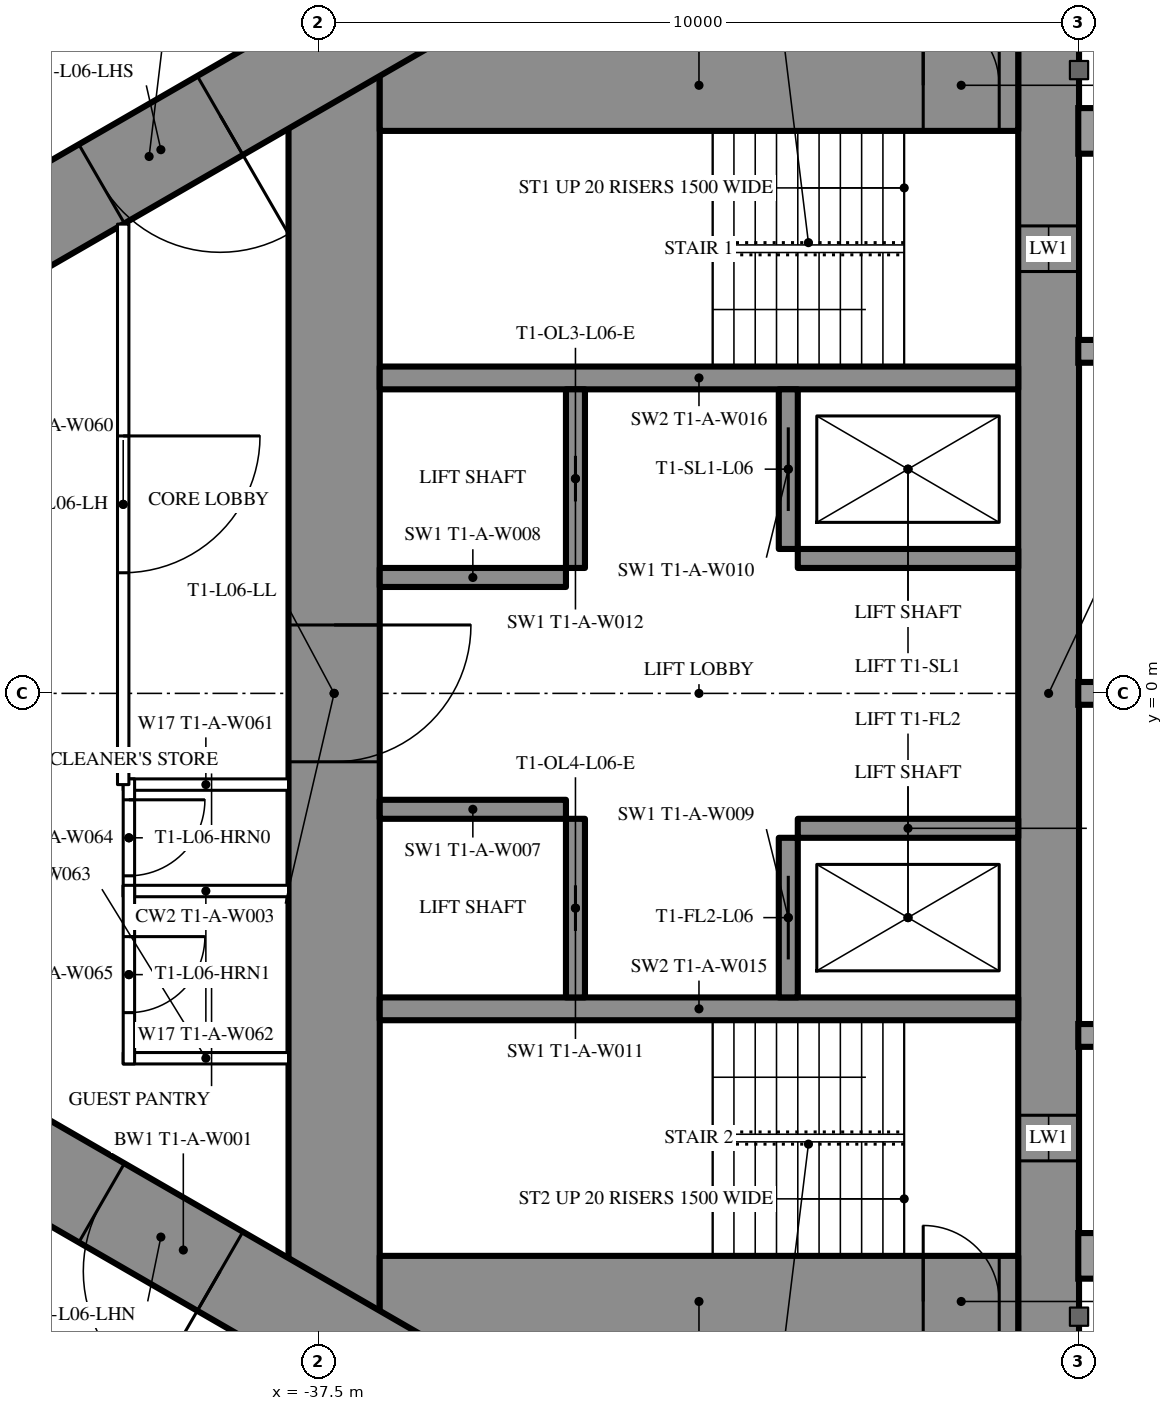
"""IFC4 building model, lengths in metres.
Left out: names, types, materials, properties, quantities, classifications, styles, units other than length and angle.
Written with IfcOpenShell. Run it as: python <this file> out.ifc"""

import sys

from ifc_helpers import new_model, si_unit, direction, frame, frame_2d, origin, place, context, subcontext, project, spatial, rectangle, extrude, element, fill, save


model = new_model("IFC4")
c1 = context("Model", 3, precision=1e-05, world=origin(), true_north=direction((0.0, 1.0)))
c2 = subcontext(c1, "Body", "Model", "MODEL_VIEW")
j1 = project(units=[si_unit("LENGTHUNIT", "METRE"), si_unit("PLANEANGLEUNIT", "RADIAN")], contexts=[c1])
p1 = place(None, origin())
s1 = spatial("IfcSite", under=j1, at=p1, CompositionType="ELEMENT")
p2 = place(p1, origin())
s2 = spatial("IfcBuilding", under=s1, at=p2, CompositionType="ELEMENT")
p3 = place(p2, frame((0.0, 0.0, 28.5)))
s3 = spatial("IfcBuildingStorey", under=s2, at=p3, CompositionType="ELEMENT", Elevation=28.5)
p4 = place(p3, frame((-27.9, 8.6, 0.0), z_axis=(0.0, 0.0, 1.0), x_axis=(0.0, -1.0, 0.0)))
e1 = element("IfcWall", 1, at=p4, inside=s3, PredefinedType="SHEAR", context=c2, shape_type="SweptSolid", body=[
    extrude(rectangle(XDim=17.2, YDim=0.8, at=frame_2d((8.6, 0.0))), origin(), (0.0, 0.0, 1.0), 3.5),
])
p5 = place(p4, frame((2.45, 0.0, 0.6)))
e2 = element("IfcOpeningElement", 2, at=p5, cuts=e1, PredefinedType="OPENING", context=c2, shape_type="SweptSolid", body=[
    extrude(rectangle(XDim=0.6, YDim=2.1, at=frame_2d((0.3, 1.05))), frame((0.0, 0.41, 0.0), z_axis=(0.0, -1.0, 0.0), x_axis=(1.0, 0.0, 0.0)), (0.0, 0.0, 1.0), 0.82),
])
p6 = place(p4, frame((14.15, 0.0, 0.6)))
e3 = element("IfcOpeningElement", 3, at=p6, cuts=e1, PredefinedType="OPENING", context=c2, shape_type="SweptSolid", body=[
    extrude(rectangle(XDim=0.6, YDim=2.1, at=frame_2d((0.3, 1.05))), frame((0.0, 0.41, 0.0), z_axis=(0.0, -1.0, 0.0), x_axis=(1.0, 0.0, 0.0)), (0.0, 0.0, 1.0), 0.82),
])
p7 = place(p3, frame((-37.3, 8.6, 0.0), z_axis=(0.0, 0.0, 1.0), x_axis=(0.0, -1.0, 0.0)))
e4 = element("IfcWall", 4, at=p7, inside=s3, PredefinedType="SHEAR", context=c2, shape_type="SweptSolid", body=[
    extrude(rectangle(XDim=17.2, YDim=1.2, at=frame_2d((8.6, 0.0))), origin(), (0.0, 0.0, 1.0), 3.5),
])
p8 = place(p7, frame((7.7, 0.0, 0.0)))
e5 = element("IfcOpeningElement", 5, at=p8, cuts=e4, PredefinedType="OPENING", context=c2, shape_type="SweptSolid", body=[
    extrude(rectangle(XDim=1.8, YDim=2.2, at=frame_2d((0.9, 1.1))), frame((0.0, 0.61, 0.0), z_axis=(0.0, -1.0, 0.0), x_axis=(1.0, 0.0, 0.0)), (0.0, 0.0, 1.0), 1.22),
])
p9 = place(p3, frame((-28.3, 8.0, 0.0), z_axis=(0.0, 0.0, 1.0), x_axis=(-1.0, 0.0, 0.0)))
e6 = element("IfcWall", 6, at=p9, inside=s3, PredefinedType="SHEAR", context=c2, shape_type="SweptSolid", body=[
    extrude(rectangle(XDim=8.4, YDim=1.2, at=frame_2d((4.2, 0.0))), origin(), (0.0, 0.0, 1.0), 3.5),
])
p10 = place(p9, frame((0.25, 0.0, 0.0)))
e7 = element("IfcOpeningElement", 7, at=p10, cuts=e6, PredefinedType="OPENING", context=c2, shape_type="SweptSolid", body=[
    extrude(rectangle(XDim=1.0, YDim=2.2, at=frame_2d((0.5, 1.1))), frame((0.0, 0.61, 0.0), z_axis=(0.0, -1.0, 0.0), x_axis=(1.0, 0.0, 0.0)), (0.0, 0.0, 1.0), 1.22),
])
p11 = place(p3, frame((-28.3, -8.0, 0.0), z_axis=(0.0, 0.0, 1.0), x_axis=(-1.0, 0.0, 0.0)))
e8 = element("IfcWall", 8, at=p11, inside=s3, PredefinedType="SHEAR", context=c2, shape_type="SweptSolid", body=[
    extrude(rectangle(XDim=8.4, YDim=1.2, at=frame_2d((4.2, 0.0))), origin(), (0.0, 0.0, 1.0), 3.5),
])
p12 = place(p11, frame((0.25, 0.0, 0.0)))
e9 = element("IfcOpeningElement", 9, at=p12, cuts=e8, PredefinedType="OPENING", context=c2, shape_type="SweptSolid", body=[
    extrude(rectangle(XDim=1.0, YDim=2.2, at=frame_2d((0.5, 1.1))), frame((0.0, 0.61, 0.0), z_axis=(0.0, -1.0, 0.0), x_axis=(1.0, 0.0, 0.0)), (0.0, 0.0, 1.0), 1.22),
])
for number, where, z_axis, x_axis in (
    (10, (-28.3, 4.15, 0.0), (0.0, 0.0, 1.0), (-1.0, 0.0, 0.0)),
    (11, (-28.3, -4.15, 0.0), (0.0, 0.0, 1.0), (-1.0, 0.0, 0.0)),
):
    element("IfcWall", number, at=place(p3, frame(where, z_axis=z_axis, x_axis=x_axis)), inside=s3, PredefinedType="SHEAR", context=c2, shape_type="SweptSolid", body=[
        extrude(rectangle(XDim=8.4, YDim=0.3, at=frame_2d((4.2, 0.0))), origin(), (0.0, 0.0, 1.0), 3.5),
    ])
p13 = place(p3, frame((-31.325, 4.0, 0.0), z_axis=(0.0, 0.0, 1.0), x_axis=(0.0, -1.0, 0.0)))
e12 = element("IfcWall", 12, at=p13, inside=s3, PredefinedType="SHEAR", context=c2, shape_type="SweptSolid", body=[
    extrude(rectangle(XDim=2.1, YDim=0.25, at=frame_2d((1.05, 0.0))), origin(), (0.0, 0.0, 1.0), 3.5),
])
p14 = place(p13, frame((0.5, 0.0, 0.0)))
e13 = element("IfcOpeningElement", 13, at=p14, cuts=e12, PredefinedType="OPENING", context=c2, shape_type="SweptSolid", body=[
    extrude(rectangle(XDim=1.1, YDim=2.2, at=frame_2d((0.55, 1.1))), frame((0.0, 0.135, 0.0), z_axis=(0.0, -1.0, 0.0), x_axis=(1.0, 0.0, 0.0)), (0.0, 0.0, 1.0), 0.27),
])
p15 = place(p3, frame((-34.125, 4.0, 0.0), z_axis=(0.0, 0.0, 1.0), x_axis=(0.0, -1.0, 0.0)))
e14 = element("IfcWall", 14, at=p15, inside=s3, PredefinedType="SHEAR", context=c2, shape_type="SweptSolid", body=[
    extrude(rectangle(XDim=2.35, YDim=0.25, at=frame_2d((1.175, 0.0))), origin(), (0.0, 0.0, 1.0), 3.5),
])
p16 = place(p15, frame((0.875, 0.0, 0.0)))
e15 = element("IfcOpeningElement", 15, at=p16, cuts=e14, PredefinedType="OPENING", context=c2, shape_type="SweptSolid", body=[
    extrude(rectangle(XDim=0.6, YDim=2.0, at=frame_2d((0.3, 1.0))), frame((0.0, 0.135, 0.0), z_axis=(0.0, -1.0, 0.0), x_axis=(1.0, 0.0, 0.0)), (0.0, 0.0, 1.0), 0.27),
])
p17 = place(p3, frame((-28.3, 1.775, 0.0), z_axis=(0.0, 0.0, 1.0), x_axis=(-1.0, 0.0, 0.0)))
e16 = element("IfcWall", 16, at=p17, inside=s3, PredefinedType="SHEAR", context=c2, shape_type="SweptSolid", body=[
    extrude(rectangle(XDim=2.9, YDim=0.25, at=frame_2d((1.45, 0.0))), origin(), (0.0, 0.0, 1.0), 3.5),
])
p18 = place(p3, frame((-34.25, 1.525, 0.0), z_axis=(0.0, 0.0, 1.0), x_axis=(-1.0, 0.0, 0.0)))
e17 = element("IfcWall", 17, at=p18, inside=s3, PredefinedType="SHEAR", context=c2, shape_type="SweptSolid", body=[
    extrude(rectangle(XDim=2.45, YDim=0.25, at=frame_2d((1.225, 0.0))), origin(), (0.0, 0.0, 1.0), 3.5),
])
p19 = place(p3, frame((-31.325, -1.9, 0.0), z_axis=(0.0, 0.0, 1.0), x_axis=(0.0, -1.0, 0.0)))
e18 = element("IfcWall", 18, at=p19, inside=s3, PredefinedType="SHEAR", context=c2, shape_type="SweptSolid", body=[
    extrude(rectangle(XDim=2.1, YDim=0.25, at=frame_2d((1.05, 0.0))), origin(), (0.0, 0.0, 1.0), 3.5),
])
p20 = place(p19, frame((0.5, 0.0, 0.0)))
e19 = element("IfcOpeningElement", 19, at=p20, cuts=e18, PredefinedType="OPENING", context=c2, shape_type="SweptSolid", body=[
    extrude(rectangle(XDim=1.1, YDim=2.2, at=frame_2d((0.55, 1.1))), frame((0.0, 0.135, 0.0), z_axis=(0.0, -1.0, 0.0), x_axis=(1.0, 0.0, 0.0)), (0.0, 0.0, 1.0), 0.27),
])
p21 = place(p3, frame((-34.125, -1.65, 0.0), z_axis=(0.0, 0.0, 1.0), x_axis=(0.0, -1.0, 0.0)))
e20 = element("IfcWall", 20, at=p21, inside=s3, PredefinedType="SHEAR", context=c2, shape_type="SweptSolid", body=[
    extrude(rectangle(XDim=2.35, YDim=0.25, at=frame_2d((1.175, 0.0))), origin(), (0.0, 0.0, 1.0), 3.5),
])
p22 = place(p21, frame((0.875, 0.0, 0.0)))
e21 = element("IfcOpeningElement", 21, at=p22, cuts=e20, PredefinedType="OPENING", context=c2, shape_type="SweptSolid", body=[
    extrude(rectangle(XDim=0.6, YDim=2.0, at=frame_2d((0.3, 1.0))), frame((0.0, 0.135, 0.0), z_axis=(0.0, -1.0, 0.0), x_axis=(1.0, 0.0, 0.0)), (0.0, 0.0, 1.0), 0.27),
])
p23 = place(p3, frame((-28.3, -1.775, 0.0), z_axis=(0.0, 0.0, 1.0), x_axis=(-1.0, 0.0, 0.0)))
e22 = element("IfcWall", 22, at=p23, inside=s3, PredefinedType="SHEAR", context=c2, shape_type="SweptSolid", body=[
    extrude(rectangle(XDim=2.9, YDim=0.25, at=frame_2d((1.45, 0.0))), origin(), (0.0, 0.0, 1.0), 3.5),
])
p24 = place(p3, frame((-34.25, -1.525, 0.0), z_axis=(0.0, 0.0, 1.0), x_axis=(-1.0, 0.0, 0.0)))
e23 = element("IfcWall", 23, at=p24, inside=s3, PredefinedType="SHEAR", context=c2, shape_type="SweptSolid", body=[
    extrude(rectangle(XDim=2.45, YDim=0.25, at=frame_2d((1.225, 0.0))), origin(), (0.0, 0.0, 1.0), 3.5),
])
p25 = place(p3, frame((-27.2, 14.3, 0.0), z_axis=(0.0, 0.0, 1.0), x_axis=(-0.866026593062, -0.499997940104, 0.0)))
e24 = element("IfcWall", 24, at=p25, inside=s3, PredefinedType="SHEAR", context=c2, shape_type="SweptSolid", body=[
    extrude(rectangle(XDim=28.946, YDim=1.2, at=frame_2d((14.473, 0.0))), origin(), (0.0, 0.0, 1.0), 3.5),
])
p26 = place(p25, frame((4.6, 0.0, 0.0)))
e25 = element("IfcOpeningElement", 25, at=p26, cuts=e24, PredefinedType="OPENING", context=c2, shape_type="SweptSolid", body=[
    extrude(rectangle(XDim=1.0, YDim=2.2, at=frame_2d((0.5, 1.1))), frame((0.0, 0.61, 0.0), z_axis=(0.0, -1.0, 0.0), x_axis=(1.0, 0.0, 0.0)), (0.0, 0.0, 1.0), 1.22),
])
p27 = place(p25, frame((13.395, 0.0, 0.0)))
e26 = element("IfcOpeningElement", 26, at=p27, cuts=e24, PredefinedType="OPENING", context=c2, shape_type="SweptSolid", body=[
    extrude(rectangle(XDim=1.8, YDim=2.2, at=frame_2d((0.9, 1.1))), frame((0.0, 0.61, 0.0), z_axis=(0.0, -1.0, 0.0), x_axis=(1.0, 0.0, 0.0)), (0.0, 0.0, 1.0), 1.22),
])
p28 = place(p3, frame((-27.2, -14.3, 0.0), z_axis=(0.0, 0.0, 1.0), x_axis=(-0.866024021859, 0.500002393557, 0.0)))
e27 = element("IfcWall", 27, at=p28, inside=s3, PredefinedType="SHEAR", context=c2, shape_type="SweptSolid", body=[
    extrude(rectangle(XDim=27.907, YDim=1.2, at=frame_2d((13.954, 0.0))), origin(), (0.0, 0.0, 1.0), 3.5),
])
p29 = place(p28, frame((4.6, 0.0, 0.0)))
e28 = element("IfcOpeningElement", 28, at=p29, cuts=e27, PredefinedType="OPENING", context=c2, shape_type="SweptSolid", body=[
    extrude(rectangle(XDim=1.0, YDim=2.2, at=frame_2d((0.5, 1.1))), frame((0.0, 0.61, 0.0), z_axis=(0.0, -1.0, 0.0), x_axis=(1.0, 0.0, 0.0)), (0.0, 0.0, 1.0), 1.22),
])
p30 = place(p28, frame((13.395, 0.0, 0.0)))
e29 = element("IfcOpeningElement", 29, at=p30, cuts=e27, PredefinedType="OPENING", context=c2, shape_type="SweptSolid", body=[
    extrude(rectangle(XDim=1.8, YDim=2.2, at=frame_2d((0.9, 1.1))), frame((0.0, 0.61, 0.0), z_axis=(0.0, -1.0, 0.0), x_axis=(1.0, 0.0, 0.0)), (0.0, 0.0, 1.0), 1.22),
])
p31 = place(p3, frame((-37.7, 10.894, 0.0), z_axis=(0.0, 0.0, 1.0), x_axis=(-0.866027905338, -0.499995667157, 0.0)))
e30 = element("IfcWall", 30, at=p31, inside=s3, PredefinedType="PARTITIONING", context=c2, shape_type="SweptSolid", body=[
    extrude(rectangle(XDim=21.787, YDim=0.2, at=frame_2d((10.894, 0.0))), origin(), (0.0, 0.0, 1.0), 3.25),
])
p32 = place(p31, frame((16.008, 0.0, 0.0)))
e31 = element("IfcOpeningElement", 31, at=p32, cuts=e30, PredefinedType="OPENING", context=c2, shape_type="SweptSolid", body=[
    extrude(rectangle(XDim=0.95, YDim=2.2, at=frame_2d((0.475, 1.1))), frame((0.0, 0.11, 0.0), z_axis=(0.0, -1.0, 0.0), x_axis=(1.0, 0.0, 0.0)), (0.0, 0.0, 1.0), 0.22),
])
p33 = place(p31, frame((20.058, 0.0, 0.0)))
e32 = element("IfcOpeningElement", 32, at=p33, cuts=e30, PredefinedType="OPENING", context=c2, shape_type="SweptSolid", body=[
    extrude(rectangle(XDim=0.95, YDim=2.2, at=frame_2d((0.475, 1.1))), frame((0.0, 0.11, 0.0), z_axis=(0.0, -1.0, 0.0), x_axis=(1.0, 0.0, 0.0)), (0.0, 0.0, 1.0), 0.22),
])
p34 = place(p31, frame((2.95, 0.0, 0.0)))
e33 = element("IfcOpeningElement", 33, at=p34, cuts=e30, PredefinedType="OPENING", context=c2, shape_type="SweptSolid", body=[
    extrude(rectangle(XDim=0.95, YDim=2.2, at=frame_2d((0.475, 1.1))), frame((0.0, 0.11, 0.0), z_axis=(0.0, -1.0, 0.0), x_axis=(1.0, 0.0, 0.0)), (0.0, 0.0, 1.0), 0.22),
])
p35 = place(p3, frame((-36.92, -11.344, 0.0), z_axis=(0.0, 0.0, 1.0), x_axis=(-0.866028313256, 0.499994960614, 0.0)))
e34 = element("IfcWall", 34, at=p35, inside=s3, PredefinedType="PARTITIONING", context=c2, shape_type="SweptSolid", body=[
    extrude(rectangle(XDim=22.568, YDim=0.2, at=frame_2d((11.284, 0.0))), origin(), (0.0, 0.0, 1.0), 3.25),
])
p36 = place(p35, frame((12.68, 0.0, 0.0)))
e35 = element("IfcOpeningElement", 35, at=p36, cuts=e34, PredefinedType="OPENING", context=c2, shape_type="SweptSolid", body=[
    extrude(rectangle(XDim=0.95, YDim=2.2, at=frame_2d((0.475, 1.1))), frame((0.0, 0.11, 0.0), z_axis=(0.0, -1.0, 0.0), x_axis=(1.0, 0.0, 0.0)), (0.0, 0.0, 1.0), 0.22),
])
p37 = place(p35, frame((3.35, 0.0, 0.0)))
e36 = element("IfcOpeningElement", 36, at=p37, cuts=e34, PredefinedType="OPENING", context=c2, shape_type="SweptSolid", body=[
    extrude(rectangle(XDim=1.0, YDim=2.2, at=frame_2d((0.5, 1.1))), frame((0.0, 0.11, 0.0), z_axis=(0.0, -1.0, 0.0), x_axis=(1.0, 0.0, 0.0)), (0.0, 0.0, 1.0), 0.22),
])
for number, where, z_axis, x_axis in (
    (37, (-37.9, -1.2, 0.0), (0.0, 0.0, 1.0), (-1.0, 0.0, 0.0)),
    (38, (-37.9, -2.6, 0.0), (0.0, 0.0, 1.0), (-1.0, 0.0, 0.0)),
    (39, (-37.9, -4.8, 0.0), (0.0, 0.0, 1.0), (-1.0, 0.0, 0.0)),
):
    element("IfcWall", number, at=place(p3, frame(where, z_axis=z_axis, x_axis=x_axis)), inside=s3, PredefinedType="PARTITIONING", context=c2, shape_type="SweptSolid", body=[
        extrude(rectangle(XDim=2.175, YDim=0.15, at=frame_2d((1.087, 0.0))), origin(), (0.0, 0.0, 1.0), 3.25),
    ])
p38 = place(p3, frame((-40.0, -1.125, 0.0), z_axis=(0.0, 0.0, 1.0), x_axis=(0.0, -1.0, 0.0)))
e40 = element("IfcWall", 40, at=p38, inside=s3, PredefinedType="PARTITIONING", context=c2, shape_type="SweptSolid", body=[
    extrude(rectangle(XDim=1.55, YDim=0.15, at=frame_2d((0.775, 0.0))), origin(), (0.0, 0.0, 1.0), 3.25),
])
p39 = place(p38, frame((0.275, 0.0, 0.0)))
e41 = element("IfcOpeningElement", 41, at=p39, cuts=e40, PredefinedType="OPENING", context=c2, shape_type="SweptSolid", body=[
    extrude(rectangle(XDim=1.0, YDim=2.2, at=frame_2d((0.5, 1.1))), frame((0.0, 0.085, 0.0), z_axis=(0.0, -1.0, 0.0), x_axis=(1.0, 0.0, 0.0)), (0.0, 0.0, 1.0), 0.17),
])
p40 = place(p3, frame((-40.0, -2.525, 0.0), z_axis=(0.0, 0.0, 1.0), x_axis=(0.0, -1.0, 0.0)))
e42 = element("IfcWall", 42, at=p40, inside=s3, PredefinedType="PARTITIONING", context=c2, shape_type="SweptSolid", body=[
    extrude(rectangle(XDim=2.35, YDim=0.15, at=frame_2d((1.175, 0.0))), origin(), (0.0, 0.0, 1.0), 3.25),
])
p41 = place(p40, frame((0.675, 0.0, 0.0)))
e43 = element("IfcOpeningElement", 43, at=p41, cuts=e42, PredefinedType="OPENING", context=c2, shape_type="SweptSolid", body=[
    extrude(rectangle(XDim=1.0, YDim=2.2, at=frame_2d((0.5, 1.1))), frame((0.0, 0.085, 0.0), z_axis=(0.0, -1.0, 0.0), x_axis=(1.0, 0.0, 0.0)), (0.0, 0.0, 1.0), 0.17),
])
p42 = place(p3, frame((-40.075, 6.174, 0.0), z_axis=(0.0, 0.0, 1.0), x_axis=(0.0, -1.0, 0.0)))
e44 = element("IfcWall", 44, at=p42, inside=s3, PredefinedType="PARTITIONING", context=c2, shape_type="SweptSolid", body=[
    extrude(rectangle(XDim=7.374, YDim=0.15, at=frame_2d((3.687, 0.0))), origin(), (0.0, 0.0, 1.0), 3.25),
])
p43 = place(p42, frame((2.787, 0.0, 0.0)))
e45 = element("IfcOpeningElement", 45, at=p43, cuts=e44, PredefinedType="OPENING", context=c2, shape_type="SweptSolid", body=[
    extrude(rectangle(XDim=1.8, YDim=2.2, at=frame_2d((0.9, 1.1))), frame((0.0, 0.085, 0.0), z_axis=(0.0, -1.0, 0.0), x_axis=(1.0, 0.0, 0.0)), (0.0, 0.0, 1.0), 0.17),
])
p44 = place(p39, origin())
e46 = element("IfcDoor", 46, at=p44, inside=s3, OperationType="SINGLE_SWING_LEFT", PredefinedType="DOOR", context=c2, shape_type="SweptSolid", body=[
    extrude(rectangle(XDim=1.0, YDim=2.2, at=frame_2d((0.5, 1.1))), frame((0.0, 0.025, 0.0), z_axis=(0.0, -1.0, 0.0), x_axis=(1.0, 0.0, 0.0)), (0.0, 0.0, 1.0), 0.05),
])
fill(e41, e46)
p45 = place(p41, origin())
e47 = element("IfcDoor", 47, at=p45, inside=s3, OperationType="SINGLE_SWING_LEFT", PredefinedType="DOOR", context=c2, shape_type="SweptSolid", body=[
    extrude(rectangle(XDim=1.0, YDim=2.2, at=frame_2d((0.5, 1.1))), frame((0.0, 0.025, 0.0), z_axis=(0.0, -1.0, 0.0), x_axis=(1.0, 0.0, 0.0)), (0.0, 0.0, 1.0), 0.05),
])
fill(e43, e47)
p46 = place(p43, origin())
e48 = element("IfcDoor", 48, at=p46, inside=s3, OperationType="DOUBLE_DOOR_SINGLE_SWING", PredefinedType="DOOR", context=c2, shape_type="SweptSolid", body=[
    extrude(rectangle(XDim=1.8, YDim=2.2, at=frame_2d((0.9, 1.1))), frame((0.0, 0.025, 0.0), z_axis=(0.0, -1.0, 0.0), x_axis=(1.0, 0.0, 0.0)), (0.0, 0.0, 1.0), 0.05),
])
fill(e45, e48)
p47 = place(p27, origin())
e49 = element("IfcDoor", 49, at=p47, inside=s3, OperationType="DOUBLE_DOOR_SINGLE_SWING", PredefinedType="DOOR", context=c2, shape_type="SweptSolid", body=[
    extrude(rectangle(XDim=1.8, YDim=2.2, at=frame_2d((0.9, 1.1))), frame((0.0, 0.025, 0.0), z_axis=(0.0, -1.0, 0.0), x_axis=(1.0, 0.0, 0.0)), (0.0, 0.0, 1.0), 0.05),
])
fill(e26, e49)
p48 = place(p30, origin())
e50 = element("IfcDoor", 50, at=p48, inside=s3, OperationType="DOUBLE_DOOR_SINGLE_SWING", PredefinedType="DOOR", context=c2, shape_type="SweptSolid", body=[
    extrude(rectangle(XDim=1.8, YDim=2.2, at=frame_2d((0.9, 1.1))), frame((0.0, 0.025, 0.0), z_axis=(0.0, -1.0, 0.0), x_axis=(1.0, 0.0, 0.0)), (0.0, 0.0, 1.0), 0.05),
])
fill(e29, e50)
p49 = place(p8, origin())
e51 = element("IfcDoor", 51, at=p49, inside=s3, OperationType="DOUBLE_DOOR_SINGLE_SWING", PredefinedType="DOOR", context=c2, shape_type="SweptSolid", body=[
    extrude(rectangle(XDim=1.8, YDim=2.2, at=frame_2d((0.9, 1.1))), frame((0.0, 0.025, 0.0), z_axis=(0.0, -1.0, 0.0), x_axis=(1.0, 0.0, 0.0)), (0.0, 0.0, 1.0), 0.05),
])
fill(e5, e51)
p50 = place(p10, origin())
e52 = element("IfcDoor", 52, at=p50, inside=s3, OperationType="SINGLE_SWING_RIGHT", PredefinedType="DOOR", context=c2, shape_type="SweptSolid", body=[
    extrude(rectangle(XDim=1.0, YDim=2.2, at=frame_2d((0.5, 1.1))), frame((0.0, 0.025, 0.0), z_axis=(0.0, -1.0, 0.0), x_axis=(1.0, 0.0, 0.0)), (0.0, 0.0, 1.0), 0.05),
])
fill(e7, e52)
p51 = place(p12, origin())
e53 = element("IfcDoor", 53, at=p51, inside=s3, OperationType="SINGLE_SWING_RIGHT", PredefinedType="DOOR", context=c2, shape_type="SweptSolid", body=[
    extrude(rectangle(XDim=1.0, YDim=2.2, at=frame_2d((0.5, 1.1))), frame((0.0, 0.025, 0.0), z_axis=(0.0, -1.0, 0.0), x_axis=(1.0, 0.0, 0.0)), (0.0, 0.0, 1.0), 0.05),
])
fill(e9, e53)
p52 = place(p14, origin())
e54 = element("IfcDoor", 54, at=p52, inside=s3, OperationType="SLIDING_TO_LEFT", PredefinedType="USERDEFINED", context=c2, shape_type="SweptSolid", body=[
    extrude(rectangle(XDim=1.1, YDim=2.2, at=frame_2d((0.55, 1.1))), frame((0.0, 0.025, 0.0), z_axis=(0.0, -1.0, 0.0), x_axis=(1.0, 0.0, 0.0)), (0.0, 0.0, 1.0), 0.05),
])
fill(e13, e54)
p53 = place(p20, origin())
e55 = element("IfcDoor", 55, at=p53, inside=s3, OperationType="SLIDING_TO_LEFT", PredefinedType="USERDEFINED", context=c2, shape_type="SweptSolid", body=[
    extrude(rectangle(XDim=1.1, YDim=2.2, at=frame_2d((0.55, 1.1))), frame((0.0, 0.025, 0.0), z_axis=(0.0, -1.0, 0.0), x_axis=(1.0, 0.0, 0.0)), (0.0, 0.0, 1.0), 0.05),
])
fill(e19, e55)
p54 = place(p16, origin())
e56 = element("IfcDoor", 56, at=p54, inside=s3, OperationType="SLIDING_TO_LEFT", PredefinedType="DOOR", context=c2, shape_type="SweptSolid", body=[
    extrude(rectangle(XDim=0.6, YDim=2.0, at=frame_2d((0.3, 1.0))), frame((0.0, 0.025, 0.0), z_axis=(0.0, -1.0, 0.0), x_axis=(1.0, 0.0, 0.0)), (0.0, 0.0, 1.0), 0.05),
])
fill(e15, e56)
p55 = place(p22, origin())
e57 = element("IfcDoor", 57, at=p55, inside=s3, OperationType="SLIDING_TO_LEFT", PredefinedType="DOOR", context=c2, shape_type="SweptSolid", body=[
    extrude(rectangle(XDim=0.6, YDim=2.0, at=frame_2d((0.3, 1.0))), frame((0.0, 0.025, 0.0), z_axis=(0.0, -1.0, 0.0), x_axis=(1.0, 0.0, 0.0)), (0.0, 0.0, 1.0), 0.05),
])
fill(e21, e57)
p56 = place(p5, origin())
e58 = element("IfcWindow", 58, at=p56, inside=s3, PartitioningType="SINGLE_PANEL", PredefinedType="WINDOW", context=c2, shape_type="SweptSolid", body=[
    extrude(rectangle(XDim=0.6, YDim=2.1, at=frame_2d((0.3, 1.05))), frame((0.0, 0.03, 0.0), z_axis=(0.0, -1.0, 0.0), x_axis=(1.0, 0.0, 0.0)), (0.0, 0.0, 1.0), 0.06),
])
fill(e2, e58)
p57 = place(p6, origin())
e59 = element("IfcWindow", 59, at=p57, inside=s3, PartitioningType="SINGLE_PANEL", PredefinedType="WINDOW", context=c2, shape_type="SweptSolid", body=[
    extrude(rectangle(XDim=0.6, YDim=2.1, at=frame_2d((0.3, 1.05))), frame((0.0, 0.03, 0.0), z_axis=(0.0, -1.0, 0.0), x_axis=(1.0, 0.0, 0.0)), (0.0, 0.0, 1.0), 0.06),
])
fill(e3, e59)
save(model, sys.argv[1])
